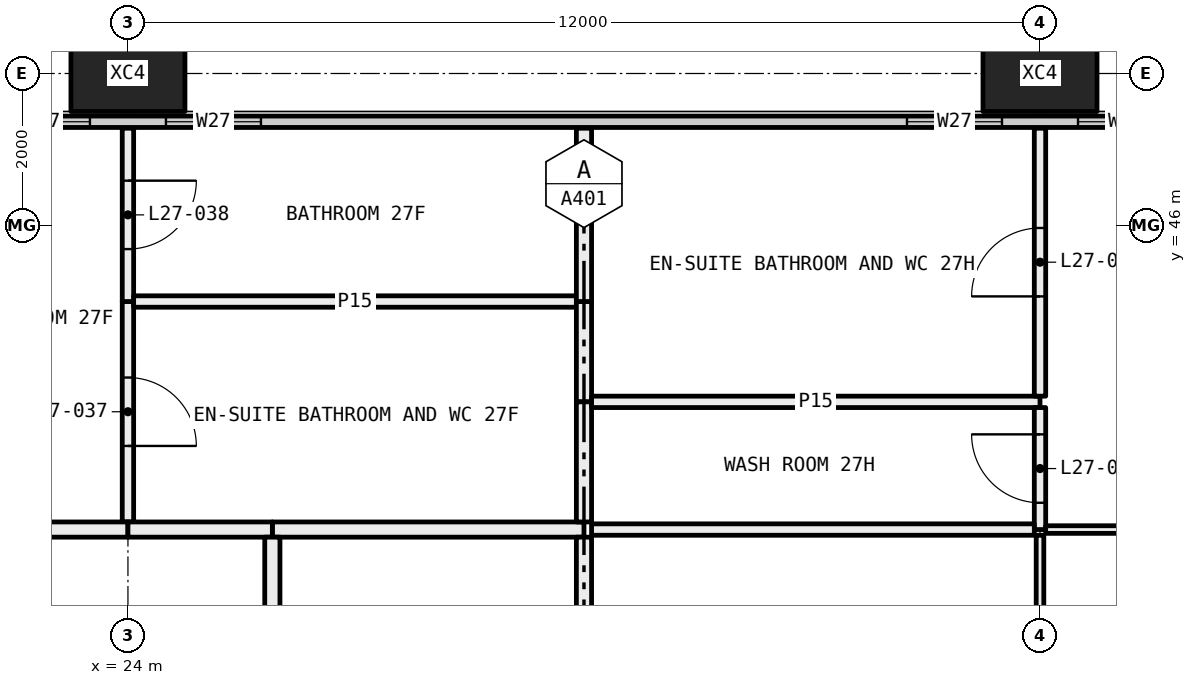
"""IFC4 building model, lengths in metres.
Left out: names, types, materials, properties, quantities, classifications, styles, units other than length and angle.
Written with IfcOpenShell. Run it as: python <this file> out.ifc"""

import sys

from ifc_helpers import new_model, si_unit, direction, frame, frame_2d, origin, origin_2d, place, context, subcontext, project, spatial, rectangle, hollow_rectangle, extrude, element, fill, save


model = new_model("IFC4")
c1 = context("Model", 3, precision=1e-05, world=origin(), true_north=direction((0.0, 1.0)))
c2 = subcontext(c1, "Body", "Model", "MODEL_VIEW")
j1 = project(units=[si_unit("LENGTHUNIT", "METRE"), si_unit("PLANEANGLEUNIT", "RADIAN")], contexts=[c1])
p1 = place(None, origin())
s1 = spatial("IfcSite", under=j1, at=p1, CompositionType="ELEMENT")
p2 = place(p1, origin())
s2 = spatial("IfcBuilding", under=s1, at=p2, CompositionType="ELEMENT")
p3 = place(p2, frame((0.0, 0.0, 106.95)))
s3 = spatial("IfcBuildingStorey", under=s2, at=p3, CompositionType="ELEMENT", Elevation=106.95)
for number, where, z_axis, x_axis in (
    (1, (24.0, 48.0, -0.4), (0.0, 0.0, 1.0), (1.0, 0.0, 0.0)),
    (2, (36.0, 48.0, -0.4), (0.0, 0.0, 1.0), (1.0, 0.0, 0.0)),
):
    element("IfcColumn", number, at=place(p3, frame(where, z_axis=z_axis, x_axis=x_axis)), inside=s3, PredefinedType="COLUMN", context=c2, shape_type="SweptSolid", body=[
        extrude(hollow_rectangle(XDim=1.5, YDim=1.0, WallThickness=0.06, at=origin_2d()), origin(), (0.0, 0.0, 1.0), 3.45),
    ])
p4 = place(p3, frame((6.56, 47.365, 0.0), z_axis=(0.0, 0.0, 1.0), x_axis=(1.0, 0.0, 0.0)))
e3 = element("IfcWall", 3, at=p4, inside=s3, PredefinedType="ELEMENTEDWALL", context=c2, shape_type="SweptSolid", body=[
    extrude(rectangle(XDim=58.88, YDim=0.15, at=frame_2d((29.44, 0.0))), origin(), (0.0, 0.0, 1.0), 3.05),
])
p5 = place(p4, frame((0.44, 0.0, 0.45)))
e4 = element("IfcOpeningElement", 4, at=p5, cuts=e3, PredefinedType="OPENING", context=c2, shape_type="SweptSolid", body=[
    extrude(rectangle(XDim=4.5, YDim=2.55, at=frame_2d((2.25, 1.275))), frame((0.0, 0.085, 0.0), z_axis=(0.0, -1.0, 0.0), x_axis=(1.0, 0.0, 0.0)), (0.0, 0.0, 1.0), 0.17),
])
p6 = place(p4, frame((5.94, 0.0, 0.45)))
e5 = element("IfcOpeningElement", 5, at=p6, cuts=e3, PredefinedType="OPENING", context=c2, shape_type="SweptSolid", body=[
    extrude(rectangle(XDim=1.25, YDim=2.55, at=frame_2d((0.625, 1.275))), frame((0.0, 0.085, 0.0), z_axis=(0.0, -1.0, 0.0), x_axis=(1.0, 0.0, 0.0)), (0.0, 0.0, 1.0), 0.17),
])
p7 = place(p4, frame((15.69, 0.0, 0.45)))
e6 = element("IfcOpeningElement", 6, at=p7, cuts=e3, PredefinedType="OPENING", context=c2, shape_type="SweptSolid", body=[
    extrude(rectangle(XDim=1.25, YDim=2.55, at=frame_2d((0.625, 1.275))), frame((0.0, 0.085, 0.0), z_axis=(0.0, -1.0, 0.0), x_axis=(1.0, 0.0, 0.0)), (0.0, 0.0, 1.0), 0.17),
])
p8 = place(p4, frame((17.94, 0.0, 0.45)))
e7 = element("IfcOpeningElement", 7, at=p8, cuts=e3, PredefinedType="OPENING", context=c2, shape_type="SweptSolid", body=[
    extrude(rectangle(XDim=1.25, YDim=2.55, at=frame_2d((0.625, 1.275))), frame((0.0, 0.085, 0.0), z_axis=(0.0, -1.0, 0.0), x_axis=(1.0, 0.0, 0.0)), (0.0, 0.0, 1.0), 0.17),
])
p9 = place(p4, frame((27.69, 0.0, 0.45)))
e8 = element("IfcOpeningElement", 8, at=p9, cuts=e3, PredefinedType="OPENING", context=c2, shape_type="SweptSolid", body=[
    extrude(rectangle(XDim=1.25, YDim=2.55, at=frame_2d((0.625, 1.275))), frame((0.0, 0.085, 0.0), z_axis=(0.0, -1.0, 0.0), x_axis=(1.0, 0.0, 0.0)), (0.0, 0.0, 1.0), 0.17),
])
p10 = place(p4, frame((29.94, 0.0, 0.45)))
e9 = element("IfcOpeningElement", 9, at=p10, cuts=e3, PredefinedType="OPENING", context=c2, shape_type="SweptSolid", body=[
    extrude(rectangle(XDim=1.25, YDim=2.55, at=frame_2d((0.625, 1.275))), frame((0.0, 0.085, 0.0), z_axis=(0.0, -1.0, 0.0), x_axis=(1.0, 0.0, 0.0)), (0.0, 0.0, 1.0), 0.17),
])
p11 = place(p4, frame((39.69, 0.0, 0.45)))
e10 = element("IfcOpeningElement", 10, at=p11, cuts=e3, PredefinedType="OPENING", context=c2, shape_type="SweptSolid", body=[
    extrude(rectangle(XDim=1.25, YDim=2.55, at=frame_2d((0.625, 1.275))), frame((0.0, 0.085, 0.0), z_axis=(0.0, -1.0, 0.0), x_axis=(1.0, 0.0, 0.0)), (0.0, 0.0, 1.0), 0.17),
])
p12 = place(p4, frame((41.94, 0.0, 0.45)))
e11 = element("IfcOpeningElement", 11, at=p12, cuts=e3, PredefinedType="OPENING", context=c2, shape_type="SweptSolid", body=[
    extrude(rectangle(XDim=1.25, YDim=2.55, at=frame_2d((0.625, 1.275))), frame((0.0, 0.085, 0.0), z_axis=(0.0, -1.0, 0.0), x_axis=(1.0, 0.0, 0.0)), (0.0, 0.0, 1.0), 0.17),
])
p13 = place(p4, frame((51.69, 0.0, 0.45)))
e12 = element("IfcOpeningElement", 12, at=p13, cuts=e3, PredefinedType="OPENING", context=c2, shape_type="SweptSolid", body=[
    extrude(rectangle(XDim=1.25, YDim=2.55, at=frame_2d((0.625, 1.275))), frame((0.0, 0.085, 0.0), z_axis=(0.0, -1.0, 0.0), x_axis=(1.0, 0.0, 0.0)), (0.0, 0.0, 1.0), 0.17),
])
p14 = place(p4, frame((53.94, 0.0, 0.45)))
e13 = element("IfcOpeningElement", 13, at=p14, cuts=e3, PredefinedType="OPENING", context=c2, shape_type="SweptSolid", body=[
    extrude(rectangle(XDim=4.5, YDim=2.55, at=frame_2d((2.25, 1.275))), frame((0.0, 0.085, 0.0), z_axis=(0.0, -1.0, 0.0), x_axis=(1.0, 0.0, 0.0)), (0.0, 0.0, 1.0), 0.17),
])
p15 = place(p3, frame((24.0, 42.1, 0.0), z_axis=(0.0, 0.0, 1.0), x_axis=(0.0, 1.0, 0.0)))
e14 = element("IfcWall", 14, at=p15, inside=s3, PredefinedType="PARTITIONING", context=c2, shape_type="SweptSolid", body=[
    extrude(rectangle(XDim=2.9, YDim=0.15, at=frame_2d((1.45, 0.0))), origin(), (0.0, 0.0, 1.0), 3.05),
])
p16 = place(p15, frame((1.0, 0.0, 0.0)))
e15 = element("IfcOpeningElement", 15, at=p16, cuts=e14, PredefinedType="OPENING", context=c2, shape_type="SweptSolid", body=[
    extrude(rectangle(XDim=0.9, YDim=2.1, at=frame_2d((0.45, 1.05))), frame((0.0, 0.085, 0.0), z_axis=(0.0, -1.0, 0.0), x_axis=(1.0, 0.0, 0.0)), (0.0, 0.0, 1.0), 0.17),
])
p17 = place(p3, frame((24.0, 45.0, 0.0), z_axis=(0.0, 0.0, 1.0), x_axis=(0.0, 1.0, 0.0)))
e16 = element("IfcWall", 16, at=p17, inside=s3, PredefinedType="PARTITIONING", context=c2, shape_type="SweptSolid", body=[
    extrude(rectangle(XDim=2.28, YDim=0.15, at=frame_2d((1.14, 0.0))), origin(), (0.0, 0.0, 1.0), 3.05),
])
p18 = place(p17, frame((0.69, 0.0, 0.0)))
e17 = element("IfcOpeningElement", 17, at=p18, cuts=e16, PredefinedType="OPENING", context=c2, shape_type="SweptSolid", body=[
    extrude(rectangle(XDim=0.9, YDim=2.1, at=frame_2d((0.45, 1.05))), frame((0.0, 0.085, 0.0), z_axis=(0.0, -1.0, 0.0), x_axis=(1.0, 0.0, 0.0)), (0.0, 0.0, 1.0), 0.17),
])
p19 = place(p3, frame((18.0, 42.0, 0.0), z_axis=(0.0, 0.0, 1.0), x_axis=(1.0, 0.0, 0.0)))
e18 = element("IfcWall", 18, at=p19, inside=s3, PredefinedType="PARTITIONING", context=c2, shape_type="SweptSolid", body=[
    extrude(rectangle(XDim=6.0, YDim=0.2, at=frame_2d((3.0, 0.0))), origin(), (0.0, 0.0, 1.0), 3.05),
])
p20 = place(p3, frame((29.9, 45.0, 0.0), z_axis=(0.0, 0.0, 1.0), x_axis=(-1.0, 0.0, 0.0)))
e19 = element("IfcWall", 19, at=p20, inside=s3, PredefinedType="PARTITIONING", context=c2, shape_type="SweptSolid", body=[
    extrude(rectangle(XDim=5.825, YDim=0.15, at=frame_2d((2.913, 0.0))), origin(), (0.0, 0.0, 1.0), 3.05),
])
p21 = place(p3, frame((25.9, 42.0, 0.0), z_axis=(0.0, 0.0, 1.0), x_axis=(1.0, 0.0, 0.0)))
e20 = element("IfcWall", 20, at=p21, inside=s3, PredefinedType="PARTITIONING", context=c2, shape_type="SweptSolid", body=[
    extrude(rectangle(XDim=4.1, YDim=0.2, at=frame_2d((2.05, 0.0))), origin(), (0.0, 0.0, 1.0), 3.05),
])
p22 = place(p3, frame((30.0, 43.68, 0.0), z_axis=(0.0, 0.0, 1.0), x_axis=(0.0, 1.0, 0.0)))
e21 = element("IfcWall", 21, at=p22, inside=s3, PredefinedType="PARTITIONING", context=c2, shape_type="SweptSolid", body=[
    extrude(rectangle(XDim=1.32, YDim=0.2, at=frame_2d((0.66, 0.0))), origin(), (0.0, 0.0, 1.0), 3.05),
])
p23 = place(p3, frame((30.0, 42.1, 0.0), z_axis=(0.0, 0.0, 1.0), x_axis=(0.0, 1.0, 0.0)))
e22 = element("IfcWall", 22, at=p23, inside=s3, PredefinedType="PARTITIONING", context=c2, shape_type="SweptSolid", body=[
    extrude(rectangle(XDim=1.58, YDim=0.2, at=frame_2d((0.79, 0.0))), origin(), (0.0, 0.0, 1.0), 3.05),
])
p24 = place(p3, frame((24.0, 42.0, 0.0), z_axis=(0.0, 0.0, 1.0), x_axis=(1.0, 0.0, 0.0)))
e23 = element("IfcWall", 23, at=p24, inside=s3, PredefinedType="PARTITIONING", context=c2, shape_type="SweptSolid", body=[
    extrude(rectangle(XDim=1.9, YDim=0.2, at=frame_2d((0.95, 0.0))), origin(), (0.0, 0.0, 1.0), 3.05),
])
p25 = place(p3, frame((30.0, 45.0, 0.0), z_axis=(0.0, 0.0, 1.0), x_axis=(0.0, 1.0, 0.0)))
e24 = element("IfcWall", 24, at=p25, inside=s3, PredefinedType="PARTITIONING", context=c2, shape_type="SweptSolid", body=[
    extrude(rectangle(XDim=2.28, YDim=0.2, at=frame_2d((1.14, 0.0))), origin(), (0.0, 0.0, 1.0), 3.05),
])
p26 = place(p3, frame((30.0, 36.1, 0.0), z_axis=(0.0, 0.0, 1.0), x_axis=(0.0, 1.0, 0.0)))
e25 = element("IfcWall", 25, at=p26, inside=s3, PredefinedType="PARTITIONING", context=c2, shape_type="SweptSolid", body=[
    extrude(rectangle(XDim=5.8, YDim=0.2, at=frame_2d((2.9, 0.0))), origin(), (0.0, 0.0, 1.0), 3.05),
])
p27 = place(p3, frame((25.9, 41.9, 0.0), z_axis=(0.0, 0.0, 1.0), x_axis=(0.0, -1.0, 0.0)))
e26 = element("IfcWall", 26, at=p27, inside=s3, PredefinedType="PARTITIONING", context=c2, shape_type="SweptSolid", body=[
    extrude(rectangle(XDim=6.0, YDim=0.2, at=frame_2d((3.0, 0.0))), origin(), (0.0, 0.0, 1.0), 2.45),
])
p28 = place(p27, frame((2.55, 0.0, 0.0)))
e27 = element("IfcOpeningElement", 27, at=p28, cuts=e26, PredefinedType="OPENING", context=c2, shape_type="SweptSolid", body=[
    extrude(rectangle(XDim=0.9, YDim=2.1, at=frame_2d((0.45, 1.05))), frame((0.0, 0.11, 0.0), z_axis=(0.0, -1.0, 0.0), x_axis=(1.0, 0.0, 0.0)), (0.0, 0.0, 1.0), 0.22),
])
p29 = place(p3, frame((30.1, 43.68, 0.0), z_axis=(0.0, 0.0, 1.0), x_axis=(1.0, 0.0, 0.0)))
e28 = element("IfcWall", 28, at=p29, inside=s3, PredefinedType="PARTITIONING", context=c2, shape_type="SweptSolid", body=[
    extrude(rectangle(XDim=5.9, YDim=0.15, at=frame_2d((2.95, 0.0))), origin(), (0.0, 0.0, 1.0), 2.45),
])
p30 = place(p3, frame((36.0, 43.755, 0.0), z_axis=(0.0, 0.0, 1.0), x_axis=(0.0, 1.0, 0.0)))
e29 = element("IfcWall", 29, at=p30, inside=s3, PredefinedType="PARTITIONING", context=c2, shape_type="SweptSolid", body=[
    extrude(rectangle(XDim=3.525, YDim=0.15, at=frame_2d((1.763, 0.0))), origin(), (0.0, 0.0, 1.0), 2.45),
])
p31 = place(p30, frame((1.312, 0.0, 0.0)))
e30 = element("IfcOpeningElement", 30, at=p31, cuts=e29, PredefinedType="OPENING", context=c2, shape_type="SweptSolid", body=[
    extrude(rectangle(XDim=0.9, YDim=2.1, at=frame_2d((0.45, 1.05))), frame((0.0, 0.085, 0.0), z_axis=(0.0, -1.0, 0.0), x_axis=(1.0, 0.0, 0.0)), (0.0, 0.0, 1.0), 0.17),
])
p32 = place(p3, frame((36.0, 42.0, 0.0), z_axis=(0.0, 0.0, 1.0), x_axis=(0.0, 1.0, 0.0)))
e31 = element("IfcWall", 31, at=p32, inside=s3, PredefinedType="PARTITIONING", context=c2, shape_type="SweptSolid", body=[
    extrude(rectangle(XDim=1.605, YDim=0.15, at=frame_2d((0.802, 0.0))), origin(), (0.0, 0.0, 1.0), 2.45),
])
p33 = place(p32, frame((0.353, 0.0, 0.0)))
e32 = element("IfcOpeningElement", 32, at=p33, cuts=e31, PredefinedType="OPENING", context=c2, shape_type="SweptSolid", body=[
    extrude(rectangle(XDim=0.9, YDim=2.1, at=frame_2d((0.45, 1.05))), frame((0.0, 0.085, 0.0), z_axis=(0.0, -1.0, 0.0), x_axis=(1.0, 0.0, 0.0)), (0.0, 0.0, 1.0), 0.17),
])
p34 = place(p3, frame((30.1, 42.0, 0.0), z_axis=(0.0, 0.0, 1.0), x_axis=(1.0, 0.0, 0.0)))
e33 = element("IfcWall", 33, at=p34, inside=s3, PredefinedType="PARTITIONING", context=c2, shape_type="SweptSolid", body=[
    extrude(rectangle(XDim=5.825, YDim=0.15, at=frame_2d((2.913, 0.0))), origin(), (0.0, 0.0, 1.0), 2.45),
])
p35 = place(p3, frame((36.075, 42.0, 0.0), z_axis=(0.0, 0.0, 1.0), x_axis=(1.0, 0.0, 0.0)))
e34 = element("IfcWall", 34, at=p35, inside=s3, PredefinedType="PARTITIONING", context=c2, shape_type="SweptSolid", body=[
    extrude(rectangle(XDim=4.425, YDim=0.1, at=frame_2d((2.212, 0.0))), origin(), (0.0, 0.0, 1.0), 2.45),
])
p36 = place(p35, frame((1.762, 0.0, 0.0)))
e35 = element("IfcOpeningElement", 35, at=p36, cuts=e34, PredefinedType="OPENING", context=c2, shape_type="SweptSolid", body=[
    extrude(rectangle(XDim=0.9, YDim=2.1, at=frame_2d((0.45, 1.05))), frame((0.0, 0.06, 0.0), z_axis=(0.0, -1.0, 0.0), x_axis=(1.0, 0.0, 0.0)), (0.0, 0.0, 1.0), 0.12),
])
p37 = place(p3, frame((36.0, 36.75, 0.0), z_axis=(0.0, 0.0, 1.0), x_axis=(0.0, 1.0, 0.0)))
e36 = element("IfcWall", 36, at=p37, inside=s3, PredefinedType="PARTITIONING", context=c2, shape_type="SweptSolid", body=[
    extrude(rectangle(XDim=5.175, YDim=0.1, at=frame_2d((2.587, 0.0))), origin(), (0.0, 0.0, 1.0), 2.45),
])
p38 = place(p37, frame((2.137, 0.0, 0.0)))
e37 = element("IfcOpeningElement", 37, at=p38, cuts=e36, PredefinedType="OPENING", context=c2, shape_type="SweptSolid", body=[
    extrude(rectangle(XDim=0.9, YDim=2.1, at=frame_2d((0.45, 1.05))), frame((0.0, 0.06, 0.0), z_axis=(0.0, -1.0, 0.0), x_axis=(1.0, 0.0, 0.0)), (0.0, 0.0, 1.0), 0.12),
])
p39 = place(p7, origin())
e38 = element("IfcWindow", 38, at=p39, inside=s3, PartitioningType="SINGLE_PANEL", PredefinedType="WINDOW", context=c2, shape_type="SweptSolid", body=[
    extrude(rectangle(XDim=1.25, YDim=2.55, at=frame_2d((0.625, 1.275))), frame((0.0, 0.03, 0.0), z_axis=(0.0, -1.0, 0.0), x_axis=(1.0, 0.0, 0.0)), (0.0, 0.0, 1.0), 0.06),
])
fill(e6, e38)
p40 = place(p8, origin())
e39 = element("IfcWindow", 39, at=p40, inside=s3, PartitioningType="SINGLE_PANEL", PredefinedType="WINDOW", context=c2, shape_type="SweptSolid", body=[
    extrude(rectangle(XDim=1.25, YDim=2.55, at=frame_2d((0.625, 1.275))), frame((0.0, 0.03, 0.0), z_axis=(0.0, -1.0, 0.0), x_axis=(1.0, 0.0, 0.0)), (0.0, 0.0, 1.0), 0.06),
])
fill(e7, e39)
p41 = place(p9, origin())
e40 = element("IfcWindow", 40, at=p41, inside=s3, PartitioningType="SINGLE_PANEL", PredefinedType="WINDOW", context=c2, shape_type="SweptSolid", body=[
    extrude(rectangle(XDim=1.25, YDim=2.55, at=frame_2d((0.625, 1.275))), frame((0.0, 0.03, 0.0), z_axis=(0.0, -1.0, 0.0), x_axis=(1.0, 0.0, 0.0)), (0.0, 0.0, 1.0), 0.06),
])
fill(e8, e40)
p42 = place(p10, origin())
e41 = element("IfcWindow", 41, at=p42, inside=s3, PartitioningType="SINGLE_PANEL", PredefinedType="WINDOW", context=c2, shape_type="SweptSolid", body=[
    extrude(rectangle(XDim=1.25, YDim=2.55, at=frame_2d((0.625, 1.275))), frame((0.0, 0.03, 0.0), z_axis=(0.0, -1.0, 0.0), x_axis=(1.0, 0.0, 0.0)), (0.0, 0.0, 1.0), 0.06),
])
fill(e9, e41)
p43 = place(p16, frame((0.9, 0.0, 0.0), x_axis=(-1.0, 0.0, 0.0)))
e42 = element("IfcDoor", 42, at=p43, inside=s3, OperationType="SINGLE_SWING_LEFT", PredefinedType="DOOR", context=c2, shape_type="SweptSolid", body=[
    extrude(rectangle(XDim=0.9, YDim=2.1, at=frame_2d((0.45, 1.05))), frame((0.0, 0.025, 0.0), z_axis=(0.0, -1.0, 0.0), x_axis=(1.0, 0.0, 0.0)), (0.0, 0.0, 1.0), 0.05),
])
fill(e15, e42)
p44 = place(p18, frame((0.9, 0.0, 0.0), x_axis=(-1.0, 0.0, 0.0)))
e43 = element("IfcDoor", 43, at=p44, inside=s3, OperationType="SINGLE_SWING_RIGHT", PredefinedType="DOOR", context=c2, shape_type="SweptSolid", body=[
    extrude(rectangle(XDim=0.9, YDim=2.1, at=frame_2d((0.45, 1.05))), frame((0.0, 0.025, 0.0), z_axis=(0.0, -1.0, 0.0), x_axis=(1.0, 0.0, 0.0)), (0.0, 0.0, 1.0), 0.05),
])
fill(e17, e43)
p45 = place(p31, origin())
e44 = element("IfcDoor", 44, at=p45, inside=s3, OperationType="SINGLE_SWING_RIGHT", PredefinedType="DOOR", context=c2, shape_type="SweptSolid", body=[
    extrude(rectangle(XDim=0.9, YDim=2.1, at=frame_2d((0.45, 1.05))), frame((0.0, 0.025, 0.0), z_axis=(0.0, -1.0, 0.0), x_axis=(1.0, 0.0, 0.0)), (0.0, 0.0, 1.0), 0.05),
])
fill(e30, e44)
p46 = place(p33, origin())
e45 = element("IfcDoor", 45, at=p46, inside=s3, OperationType="SINGLE_SWING_LEFT", PredefinedType="DOOR", context=c2, shape_type="SweptSolid", body=[
    extrude(rectangle(XDim=0.9, YDim=2.1, at=frame_2d((0.45, 1.05))), frame((0.0, 0.025, 0.0), z_axis=(0.0, -1.0, 0.0), x_axis=(1.0, 0.0, 0.0)), (0.0, 0.0, 1.0), 0.05),
])
fill(e32, e45)
save(model, sys.argv[1])
